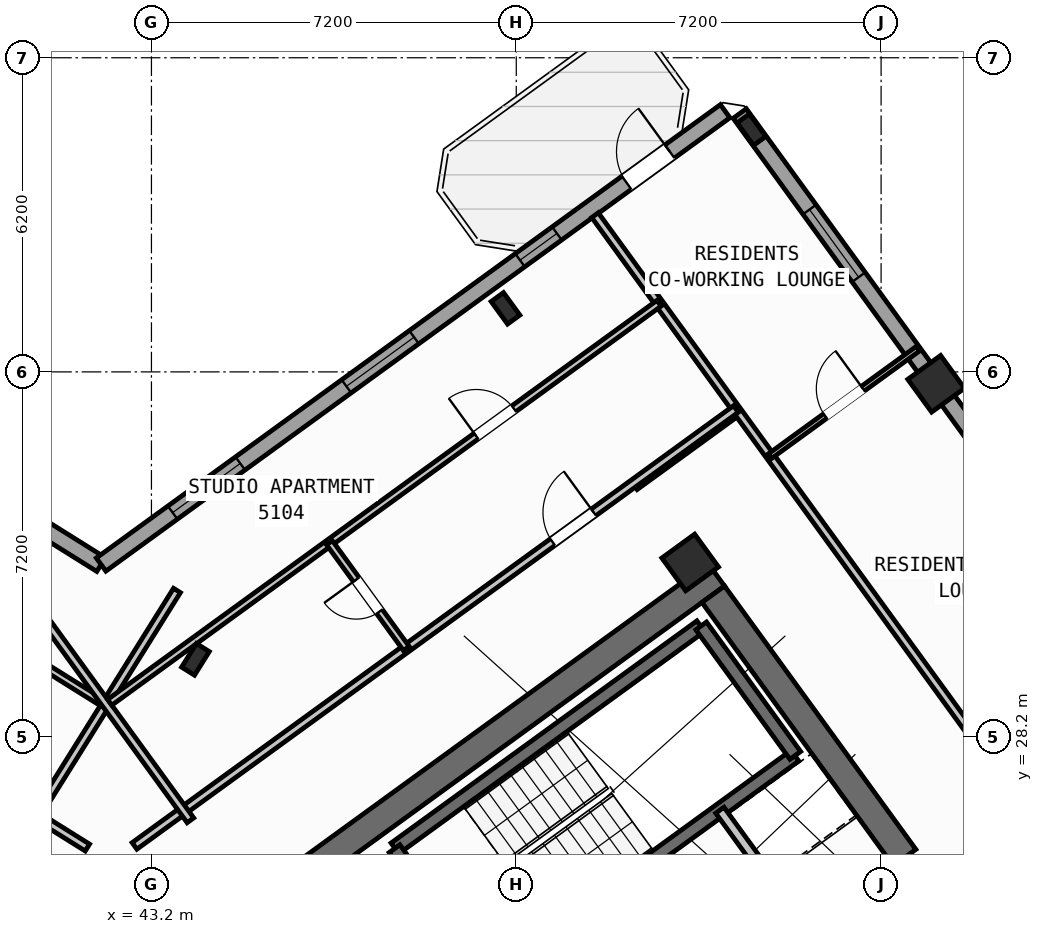
"""IFC4 building model, lengths in metres.
Left out: names, types, materials, properties, quantities, classifications, styles, units other than length and angle.
Written with IfcOpenShell. Run it as: python <this file> out.ifc"""

import sys

from ifc_helpers import new_model, si_unit, direction, frame, frame_2d, origin, origin_2d, place, context, subcontext, project, spatial, rectangle, hollow_rectangle, i_section, extrude, source, transform, mapped, element, fill, save


model = new_model("IFC4")
c1 = context("Model", 3, precision=1e-05, world=origin(), true_north=direction((0.0, 1.0)))
c2 = subcontext(c1, "Body", "Model", "MODEL_VIEW")
j1 = project(units=[si_unit("LENGTHUNIT", "METRE"), si_unit("PLANEANGLEUNIT", "RADIAN")], contexts=[c1])
p1 = place(None, origin())
s1 = spatial("IfcSite", under=j1, at=p1, CompositionType="ELEMENT")
p2 = place(p1, origin())
s2 = spatial("IfcBuilding", under=s1, at=p2, CompositionType="ELEMENT")
p3 = place(p2, frame((0.0, 0.0, 204.0)))
s3 = spatial("IfcBuildingStorey", under=s2, at=p3, CompositionType="ELEMENT", Elevation=204.0)
p4 = place(p3, frame((44.365, 24.142, 0.0), z_axis=(0.0, 0.0, 1.0), x_axis=(0.809024304885, 0.587775190107, 0.0)))
e1 = element("IfcWall", 1, at=p4, inside=s3, PredefinedType="SHEAR", context=c2, shape_type="SweptSolid", body=[
    extrude(rectangle(XDim=12.34, YDim=0.55, at=frame_2d((6.17, 0.0))), origin(), (0.0, 0.0, 1.0), 3.35),
])
p5 = place(p3, frame((58.064, 25.813, 0.0), z_axis=(0.0, 0.0, 1.0), x_axis=(-0.587764933797, 0.809031756236, 0.0)))
e2 = element("IfcWall", 2, at=p5, inside=s3, PredefinedType="SHEAR", context=c2, shape_type="SweptSolid", body=[
    extrude(rectangle(XDim=6.425, YDim=0.55, at=frame_2d((3.212, 0.0))), origin(), (0.0, 0.0, 1.0), 3.35),
])
m1 = source(origin(), c2, "Body", "SweptSolid", [
    extrude(i_section(OverallWidth=0.3, OverallDepth=0.55, WebThickness=0.015, FlangeThickness=0.029, at=origin_2d()), origin(), (0.0, 0.0, 1.0), 3.6),
])
p6 = place(p3, frame((44.068, 29.726, 0.0), z_axis=(0.0, 0.0, 1.0), x_axis=(-0.848048096156, 0.529919264233, 0.0)))
e3 = element("IfcColumn", 3, at=p6, inside=s3, PredefinedType="COLUMN", context=c2, shape_type="MappedRepresentation", body=[
    mapped(m1, transform((0.0, 0.0, 0.0), scale=1.0)),
])
m2 = source(origin(), c2, "Body", "SweptSolid", [
    extrude(hollow_rectangle(XDim=0.8, YDim=0.8, WallThickness=0.032, at=origin_2d()), origin(), (0.0, 0.0, 1.0), 3.6),
])
p7 = place(p3, frame((53.832, 31.638, 0.0), z_axis=(0.0, 0.0, 1.0), x_axis=(0.809016994375, 0.587785252292, 0.0)))
e4 = element("IfcColumn", 4, at=p7, inside=s3, PredefinedType="COLUMN", context=c2, shape_type="MappedRepresentation", body=[
    mapped(m2, transform((0.0, 0.0, 0.0), scale=1.0)),
])
p8 = place(p3, frame((50.188, 36.654, 0.0), z_axis=(0.0, 0.0, 1.0), x_axis=(0.809016994375, 0.587785252292, 0.0)))
e5 = element("IfcColumn", 5, at=p8, inside=s3, PredefinedType="COLUMN", context=c2, shape_type="MappedRepresentation", body=[
    mapped(m1, transform((0.0, 0.0, 0.0), scale=1.0)),
])
p9 = place(p3, frame((58.686, 35.165, 0.0), z_axis=(0.0, 0.0, 1.0), x_axis=(0.809016994375, 0.587785252292, 0.0)))
e6 = element("IfcColumn", 6, at=p9, inside=s3, PredefinedType="COLUMN", context=c2, shape_type="MappedRepresentation", body=[
    mapped(m2, transform((0.0, 0.0, 0.0), scale=1.0)),
])
p10 = place(p3, frame((55.042, 40.181, 0.0), z_axis=(0.0, 0.0, 1.0), x_axis=(0.809016994375, 0.587785252292, 0.0)))
e7 = element("IfcColumn", 7, at=p10, inside=s3, PredefinedType="COLUMN", context=c2, shape_type="MappedRepresentation", body=[
    mapped(m1, transform((0.0, 0.0, 0.0), scale=1.0)),
])
p11 = place(p3, frame((17.424, 47.083, 0.0), z_axis=(0.0, 0.0, 1.0), x_axis=(0.848049927979, -0.529916332693, 0.0)))
e8 = element("IfcWall", 8, at=p11, inside=s3, PredefinedType="STANDARD", context=c2, shape_type="SweptSolid", body=[
    extrude(rectangle(XDim=29.223, YDim=0.32, at=frame_2d((14.612, 0.0))), origin(), (0.0, 0.0, 1.0), 3.35),
])
p12 = place(p11, frame((8.799, 0.0, 0.0)))
e9 = element("IfcOpeningElement", 9, at=p12, cuts=e8, PredefinedType="OPENING", context=c2, shape_type="SweptSolid", body=[
    extrude(rectangle(XDim=1.05, YDim=2.15, at=frame_2d((0.525, 1.075))), frame((0.0, 0.17, 0.0), z_axis=(0.0, -1.0, 0.0), x_axis=(1.0, 0.0, 0.0)), (0.0, 0.0, 1.0), 0.34),
])
p13 = place(p11, frame((0.794, 0.0, 0.9)))
e10 = element("IfcOpeningElement", 10, at=p13, cuts=e8, PredefinedType="OPENING", context=c2, shape_type="SweptSolid", body=[
    extrude(rectangle(XDim=1.65, YDim=1.45, at=frame_2d((0.825, 0.725))), frame((0.0, 0.17, 0.0), z_axis=(0.0, -1.0, 0.0), x_axis=(1.0, 0.0, 0.0)), (0.0, 0.0, 1.0), 0.34),
])
p14 = place(p11, frame((4.056, 0.0, 0.9)))
e11 = element("IfcOpeningElement", 11, at=p14, cuts=e8, PredefinedType="OPENING", context=c2, shape_type="SweptSolid", body=[
    extrude(rectangle(XDim=1.35, YDim=1.45, at=frame_2d((0.675, 0.725))), frame((0.0, 0.17, 0.0), z_axis=(0.0, -1.0, 0.0), x_axis=(1.0, 0.0, 0.0)), (0.0, 0.0, 1.0), 0.34),
])
p15 = place(p11, frame((7.151, 0.0, 1.0)))
e12 = element("IfcOpeningElement", 12, at=p15, cuts=e8, PredefinedType="OPENING", context=c2, shape_type="SweptSolid", body=[
    extrude(rectangle(XDim=0.9, YDim=1.25, at=frame_2d((0.45, 0.625))), frame((0.0, 0.17, 0.0), z_axis=(0.0, -1.0, 0.0), x_axis=(1.0, 0.0, 0.0)), (0.0, 0.0, 1.0), 0.34),
])
p16 = place(p11, frame((14.612, 0.0, 1.0)))
e13 = element("IfcOpeningElement", 13, at=p16, cuts=e8, PredefinedType="OPENING", context=c2, shape_type="SweptSolid", body=[
    extrude(rectangle(XDim=0.9, YDim=1.25, at=frame_2d((0.45, 0.625))), frame((0.0, 0.17, 0.0), z_axis=(0.0, -1.0, 0.0), x_axis=(1.0, 0.0, 0.0)), (0.0, 0.0, 1.0), 0.34),
])
p17 = place(p11, frame((17.254, 0.0, 1.0)))
e14 = element("IfcOpeningElement", 14, at=p17, cuts=e8, PredefinedType="OPENING", context=c2, shape_type="SweptSolid", body=[
    extrude(rectangle(XDim=0.9, YDim=1.25, at=frame_2d((0.45, 0.625))), frame((0.0, 0.17, 0.0), z_axis=(0.0, -1.0, 0.0), x_axis=(1.0, 0.0, 0.0)), (0.0, 0.0, 1.0), 0.34),
])
p18 = place(p11, frame((21.139, 0.0, 0.9)))
e15 = element("IfcOpeningElement", 15, at=p18, cuts=e8, PredefinedType="OPENING", context=c2, shape_type="SweptSolid", body=[
    extrude(rectangle(XDim=1.35, YDim=1.45, at=frame_2d((0.675, 0.725))), frame((0.0, 0.17, 0.0), z_axis=(0.0, -1.0, 0.0), x_axis=(1.0, 0.0, 0.0)), (0.0, 0.0, 1.0), 0.34),
])
p19 = place(p11, frame((25.778, 0.0, 0.9)))
e16 = element("IfcOpeningElement", 16, at=p19, cuts=e8, PredefinedType="OPENING", context=c2, shape_type="SweptSolid", body=[
    extrude(rectangle(XDim=1.35, YDim=1.45, at=frame_2d((0.675, 0.725))), frame((0.0, 0.17, 0.0), z_axis=(0.0, -1.0, 0.0), x_axis=(1.0, 0.0, 0.0)), (0.0, 0.0, 1.0), 0.34),
])
p20 = place(p3, frame((42.207, 31.597, 0.0), z_axis=(0.0, 0.0, 1.0), x_axis=(0.809020333377, 0.587780656523, 0.0)))
e17 = element("IfcWall", 17, at=p20, inside=s3, PredefinedType="STANDARD", context=c2, shape_type="SweptSolid", body=[
    extrude(rectangle(XDim=15.223, YDim=0.32, at=frame_2d((7.611, 0.0))), origin(), (0.0, 0.0, 1.0), 3.35),
])
p21 = place(p20, frame((12.82, 0.0, 0.0)))
e18 = element("IfcOpeningElement", 18, at=p21, cuts=e17, PredefinedType="OPENING", context=c2, shape_type="SweptSolid", body=[
    extrude(rectangle(XDim=1.05, YDim=2.15, at=frame_2d((0.525, 1.075))), frame((0.0, 0.17, 0.0), z_axis=(0.0, -1.0, 0.0), x_axis=(1.0, 0.0, 0.0)), (0.0, 0.0, 1.0), 0.34),
])
p22 = place(p20, frame((1.745, 0.0, 0.9)))
e19 = element("IfcOpeningElement", 19, at=p22, cuts=e17, PredefinedType="OPENING", context=c2, shape_type="SweptSolid", body=[
    extrude(rectangle(XDim=1.65, YDim=1.45, at=frame_2d((0.825, 0.725))), frame((0.0, 0.17, 0.0), z_axis=(0.0, -1.0, 0.0), x_axis=(1.0, 0.0, 0.0)), (0.0, 0.0, 1.0), 0.34),
])
p23 = place(p20, frame((5.985, 0.0, 0.9)))
e20 = element("IfcOpeningElement", 20, at=p23, cuts=e17, PredefinedType="OPENING", context=c2, shape_type="SweptSolid", body=[
    extrude(rectangle(XDim=1.65, YDim=1.45, at=frame_2d((0.825, 0.725))), frame((0.0, 0.17, 0.0), z_axis=(0.0, -1.0, 0.0), x_axis=(1.0, 0.0, 0.0)), (0.0, 0.0, 1.0), 0.34),
])
p24 = place(p20, frame((10.219, 0.0, 1.0)))
e21 = element("IfcOpeningElement", 21, at=p24, cuts=e17, PredefinedType="OPENING", context=c2, shape_type="SweptSolid", body=[
    extrude(rectangle(XDim=0.9, YDim=1.25, at=frame_2d((0.45, 0.625))), frame((0.0, 0.17, 0.0), z_axis=(0.0, -1.0, 0.0), x_axis=(1.0, 0.0, 0.0)), (0.0, 0.0, 1.0), 0.34),
])
p25 = place(p3, frame((54.81, 40.5, 0.0), z_axis=(0.0, 0.0, 1.0), x_axis=(0.587783625747, -0.809018176127, 0.0)))
e22 = element("IfcWall", 22, at=p25, inside=s3, PredefinedType="STANDARD", context=c2, shape_type="SweptSolid", body=[
    extrude(rectangle(XDim=21.587, YDim=0.32, at=frame_2d((10.794, 0.0))), origin(), (0.0, 0.0, 1.0), 2.825),
])
p26 = place(p25, frame((2.343, 0.0, 0.9)))
e23 = element("IfcOpeningElement", 23, at=p26, cuts=e22, PredefinedType="OPENING", context=c2, shape_type="SweptSolid", body=[
    extrude(rectangle(XDim=1.65, YDim=1.45, at=frame_2d((0.825, 0.725))), frame((0.0, 0.17, 0.0), z_axis=(0.0, -1.0, 0.0), x_axis=(1.0, 0.0, 0.0)), (0.0, 0.0, 1.0), 0.34),
])
p27 = place(p25, frame((8.119, 0.0, 0.9)))
e24 = element("IfcOpeningElement", 24, at=p27, cuts=e22, PredefinedType="OPENING", context=c2, shape_type="SweptSolid", body=[
    extrude(rectangle(XDim=1.35, YDim=1.45, at=frame_2d((0.675, 0.725))), frame((0.0, 0.17, 0.0), z_axis=(0.0, -1.0, 0.0), x_axis=(1.0, 0.0, 0.0)), (0.0, 0.0, 1.0), 0.34),
])
p28 = place(p25, frame((11.019, 0.0, 0.9)))
e25 = element("IfcOpeningElement", 25, at=p28, cuts=e22, PredefinedType="OPENING", context=c2, shape_type="SweptSolid", body=[
    extrude(rectangle(XDim=1.35, YDim=1.45, at=frame_2d((0.675, 0.725))), frame((0.0, 0.17, 0.0), z_axis=(0.0, -1.0, 0.0), x_axis=(1.0, 0.0, 0.0)), (0.0, 0.0, 1.0), 0.34),
])
p29 = place(p25, frame((18.634, 0.0, 1.0)))
e26 = element("IfcOpeningElement", 26, at=p29, cuts=e22, PredefinedType="OPENING", context=c2, shape_type="SweptSolid", body=[
    extrude(rectangle(XDim=0.9, YDim=1.25, at=frame_2d((0.45, 0.625))), frame((0.0, 0.17, 0.0), z_axis=(0.0, -1.0, 0.0), x_axis=(1.0, 0.0, 0.0)), (0.0, 0.0, 1.0), 0.34),
])
p30 = place(p3, frame((48.006, 25.996, 0.0), z_axis=(0.0, 0.0, 1.0), x_axis=(0.80901903764, 0.587782439969, 0.0)))
e27 = element("IfcWall", 27, at=p30, inside=s3, PredefinedType="SHEAR", context=c2, shape_type="SweptSolid", body=[
    extrude(rectangle(XDim=7.46, YDim=0.26, at=frame_2d((3.73, 0.0))), origin(), (0.0, 0.0, 1.0), 3.35),
])
p31 = place(p3, frame((49.863, 23.44, 0.0), z_axis=(0.0, 0.0, 1.0), x_axis=(0.809003474932, 0.587803859759, 0.0)))
e28 = element("IfcWall", 28, at=p31, inside=s3, PredefinedType="SHEAR", context=c2, shape_type="SweptSolid", body=[
    extrude(rectangle(XDim=7.46, YDim=0.26, at=frame_2d((3.73, 0.0))), origin(), (0.0, 0.0, 1.0), 3.35),
])
p32 = place(p31, frame((0.36, 0.0, 0.0)))
e29 = element("IfcOpeningElement", 29, at=p32, cuts=e28, PredefinedType="OPENING", context=c2, shape_type="SweptSolid", body=[
    extrude(rectangle(XDim=0.86, YDim=2.05, at=frame_2d((0.43, 1.025))), frame((0.0, 0.14, 0.0), z_axis=(0.0, -1.0, 0.0), x_axis=(1.0, 0.0, 0.0)), (0.0, 0.0, 1.0), 0.28),
])
p33 = place(p3, frame((49.855, 23.434, 0.0), z_axis=(0.0, 0.0, 1.0), x_axis=(-0.58776738483, 0.809029975545, 0.0)))
e30 = element("IfcWall", 30, at=p33, inside=s3, PredefinedType="SHEAR", context=c2, shape_type="SweptSolid", body=[
    extrude(rectangle(XDim=3.16, YDim=0.26, at=frame_2d((1.58, 0.0))), origin(), (0.0, 0.0, 1.0), 3.35),
])
p34 = place(p3, frame((55.906, 27.831, 0.0), z_axis=(0.0, 0.0, 1.0), x_axis=(-0.587804123638, 0.809003283204, 0.0)))
e31 = element("IfcWall", 31, at=p34, inside=s3, PredefinedType="SHEAR", context=c2, shape_type="SweptSolid", body=[
    extrude(rectangle(XDim=3.16, YDim=0.26, at=frame_2d((1.58, 0.0))), origin(), (0.0, 0.0, 1.0), 3.35),
])
p35 = place(p3, frame((56.111, 24.419, 0.0), z_axis=(0.0, 0.0, 1.0), x_axis=(-0.58777848983, 0.809021907548, 0.0)))
e32 = element("IfcWall", 32, at=p35, inside=s3, PredefinedType="STANDARD", context=c2, shape_type="SweptSolid", body=[
    extrude(rectangle(XDim=2.88, YDim=0.2, at=frame_2d((1.44, 0.0))), origin(), (0.0, 0.0, 1.0), 3.34),
])
p36 = place(p3, frame((41.936, 26.012, 0.0), z_axis=(0.0, 0.0, 1.0), x_axis=(-0.848051154596, 0.529914369676, 0.0)))
e33 = element("IfcWall", 33, at=p36, inside=s3, PredefinedType="PARTITIONING", context=c2, shape_type="SweptSolid", body=[
    extrude(rectangle(XDim=15.57, YDim=0.16, at=frame_2d((7.785, 0.0))), origin(), (0.0, 0.0, 1.0), 3.34),
])
p37 = place(p36, frame((10.83, 0.0, 0.0)))
e34 = element("IfcOpeningElement", 34, at=p37, cuts=e33, PredefinedType="OPENING", context=c2, shape_type="SweptSolid", body=[
    extrude(rectangle(XDim=1.0, YDim=2.1, at=frame_2d((0.5, 1.05))), frame((0.0, 0.09, 0.0), z_axis=(0.0, -1.0, 0.0), x_axis=(1.0, 0.0, 0.0)), (0.0, 0.0, 1.0), 0.18),
])
p38 = place(p3, frame((43.704, 31.086, 0.0), z_axis=(0.0, 0.0, 1.0), x_axis=(-0.529906828443, -0.848055866774, 0.0)))
e35 = element("IfcWall", 35, at=p38, inside=s3, PredefinedType="PARTITIONING", context=c2, shape_type="SweptSolid", body=[
    extrude(rectangle(XDim=5.48, YDim=0.16, at=frame_2d((2.74, 0.0))), origin(), (0.0, 0.0, 1.0), 3.34),
])
p39 = place(p3, frame((42.226, 28.873, 0.0), z_axis=(0.0, 0.0, 1.0), x_axis=(-0.848049134363, 0.529917602752, 0.0)))
e36 = element("IfcWall", 36, at=p39, inside=s3, PredefinedType="PLUMBINGWALL", context=c2, shape_type="SweptSolid", body=[
    extrude(rectangle(XDim=14.3, YDim=0.14, at=frame_2d((7.15, 0.0))), origin(), (0.0, 0.0, 1.0), 3.34),
])
p40 = place(p39, frame((9.57, 0.0, 0.0)))
e37 = element("IfcOpeningElement", 37, at=p40, cuts=e36, PredefinedType="OPENING", context=c2, shape_type="SweptSolid", body=[
    extrude(rectangle(XDim=0.92, YDim=2.08, at=frame_2d((0.46, 1.04))), frame((0.0, 0.08, 0.0), z_axis=(0.0, -1.0, 0.0), x_axis=(1.0, 0.0, 0.0)), (0.0, 0.0, 1.0), 0.16),
])
p41 = place(p3, frame((52.739, 33.143, 0.0), z_axis=(0.0, 0.0, 1.0), x_axis=(0.809000999347, 0.58780726693, 0.0)))
e38 = element("IfcWall", 38, at=p41, inside=s3, PredefinedType="PARTITIONING", context=c2, shape_type="SweptSolid", body=[
    extrude(rectangle(XDim=2.51, YDim=0.16, at=frame_2d((1.255, 0.0))), origin(), (0.0, 0.0, 1.0), 3.34),
])
p42 = place(p3, frame((60.829, 26.278, 0.0), z_axis=(0.0, 0.0, 1.0), x_axis=(-0.587777474174, 0.809022645451, 0.0)))
e39 = element("IfcWall", 39, at=p42, inside=s3, PredefinedType="PARTITIONING", context=c2, shape_type="SweptSolid", body=[
    extrude(rectangle(XDim=15.1, YDim=0.16, at=frame_2d((7.55, 0.0))), origin(), (0.0, 0.0, 1.0), 3.34),
])
p43 = place(p3, frame((55.409, 33.738, 0.0), z_axis=(0.0, 0.0, 1.0), x_axis=(0.809005039917, 0.58780170584, 0.0)))
e40 = element("IfcWall", 40, at=p43, inside=s3, PredefinedType="PARTITIONING", context=c2, shape_type="SweptSolid", body=[
    extrude(rectangle(XDim=3.61, YDim=0.11, at=frame_2d((1.805, 0.0))), origin(), (0.0, 0.0, 1.0), 3.34),
])
p44 = place(p43, frame((1.345, 0.0, 0.0)))
e41 = element("IfcOpeningElement", 41, at=p44, cuts=e40, PredefinedType="OPENING", context=c2, shape_type="SweptSolid", body=[
    extrude(rectangle(XDim=0.92, YDim=2.08, at=frame_2d((0.46, 1.04))), frame((0.0, 0.065, 0.0), z_axis=(0.0, -1.0, 0.0), x_axis=(1.0, 0.0, 0.0)), (0.0, 0.0, 1.0), 0.13),
])
p45 = place(p3, frame((42.866, 26.044, 0.0), z_axis=(0.0, 0.0, 1.0), x_axis=(0.809020254154, 0.587780765566, 0.0)))
e42 = element("IfcWall", 42, at=p45, inside=s3, PredefinedType="PARTITIONING", context=c2, shape_type="SweptSolid", body=[
    extrude(rectangle(XDim=14.67, YDim=0.16, at=frame_2d((7.335, 0.0))), origin(), (0.0, 0.0, 1.0), 3.34),
])
p46 = place(p45, frame((10.2, 0.0, 0.0)))
e43 = element("IfcOpeningElement", 43, at=p46, cuts=e42, PredefinedType="OPENING", context=c2, shape_type="SweptSolid", body=[
    extrude(rectangle(XDim=1.0, YDim=2.1, at=frame_2d((0.5, 1.05))), frame((0.0, 0.09, 0.0), z_axis=(0.0, -1.0, 0.0), x_axis=(1.0, 0.0, 0.0)), (0.0, 0.0, 1.0), 0.18),
])
p47 = place(p3, frame((43.969, 26.55, 0.0), z_axis=(0.0, 0.0, 1.0), x_axis=(-0.587776919386, 0.80902304852, 0.0)))
e44 = element("IfcWall", 44, at=p47, inside=s3, PredefinedType="PARTITIONING", context=c2, shape_type="SweptSolid", body=[
    extrude(rectangle(XDim=5.48, YDim=0.16, at=frame_2d((2.74, 0.0))), origin(), (0.0, 0.0, 1.0), 3.34),
])
p48 = place(p3, frame((42.377, 28.878, 0.0), z_axis=(0.0, 0.0, 1.0), x_axis=(0.809020411523, 0.587780548963, 0.0)))
e45 = element("IfcWall", 45, at=p48, inside=s3, PredefinedType="PLUMBINGWALL", context=c2, shape_type="SweptSolid", body=[
    extrude(rectangle(XDim=13.4, YDim=0.14, at=frame_2d((6.7, 0.0))), origin(), (0.0, 0.0, 1.0), 3.34),
])
p49 = place(p48, frame((8.94, 0.0, 0.0)))
e46 = element("IfcOpeningElement", 46, at=p49, cuts=e45, PredefinedType="OPENING", context=c2, shape_type="SweptSolid", body=[
    extrude(rectangle(XDim=0.92, YDim=2.08, at=frame_2d((0.46, 1.04))), frame((0.0, 0.08, 0.0), z_axis=(0.0, -1.0, 0.0), x_axis=(1.0, 0.0, 0.0)), (0.0, 0.0, 1.0), 0.16),
])
p50 = place(p3, frame((48.229, 29.941, 0.0), z_axis=(0.0, 0.0, 1.0), x_axis=(-0.587772116736, 0.809026537752, 0.0)))
e47 = element("IfcWall", 47, at=p50, inside=s3, PredefinedType="PLUMBINGWALL", context=c2, shape_type="SweptSolid", body=[
    extrude(rectangle(XDim=2.58, YDim=0.14, at=frame_2d((1.29, 0.0))), origin(), (0.0, 0.0, 1.0), 3.34),
])
p51 = place(p50, frame((0.9, 0.0, 0.0)))
e48 = element("IfcOpeningElement", 48, at=p51, cuts=e47, PredefinedType="OPENING", context=c2, shape_type="SweptSolid", body=[
    extrude(rectangle(XDim=0.78, YDim=2.05, at=frame_2d((0.39, 1.025))), frame((0.0, 0.08, 0.0), z_axis=(0.0, -1.0, 0.0), x_axis=(1.0, 0.0, 0.0)), (0.0, 0.0, 1.0), 0.16),
])
m3 = source(origin(), c2, "Body", "SweptSolid", [
    extrude(rectangle(XDim=1.05, YDim=2.15, at=frame_2d((0.525, 1.075))), frame((0.0, 0.025, 0.0), z_axis=(0.0, -1.0, 0.0), x_axis=(1.0, 0.0, 0.0)), (0.0, 0.0, 1.0), 0.05),
])
p52 = place(p21, origin())
e49 = element("IfcDoor", 49, at=p52, inside=s3, OperationType="SINGLE_SWING_RIGHT", PredefinedType="DOOR", context=c2, shape_type="MappedRepresentation", body=[
    mapped(m3, transform((0.0, 0.0, 0.0), scale=1.0)),
])
fill(e18, e49)
m4 = source(origin(), c2, "Body", "SweptSolid", [
    extrude(rectangle(XDim=1.65, YDim=1.45, at=frame_2d((0.825, 0.725))), frame((0.0, 0.03, 0.0), z_axis=(0.0, -1.0, 0.0), x_axis=(1.0, 0.0, 0.0)), (0.0, 0.0, 1.0), 0.06),
])
p53 = place(p22, origin())
e50 = element("IfcWindow", 50, at=p53, inside=s3, PartitioningType="SINGLE_PANEL", PredefinedType="WINDOW", context=c2, shape_type="MappedRepresentation", body=[
    mapped(m4, transform((0.0, 0.0, 0.0), scale=1.0)),
])
fill(e19, e50)
p54 = place(p23, origin())
e51 = element("IfcWindow", 51, at=p54, inside=s3, PartitioningType="SINGLE_PANEL", PredefinedType="WINDOW", context=c2, shape_type="MappedRepresentation", body=[
    mapped(m4, transform((0.0, 0.0, 0.0), scale=1.0)),
])
fill(e20, e51)
m5 = source(origin(), c2, "Body", "SweptSolid", [
    extrude(rectangle(XDim=0.9, YDim=1.25, at=frame_2d((0.45, 0.625))), frame((0.0, 0.03, 0.0), z_axis=(0.0, -1.0, 0.0), x_axis=(1.0, 0.0, 0.0)), (0.0, 0.0, 1.0), 0.06),
])
p55 = place(p24, origin())
e52 = element("IfcWindow", 52, at=p55, inside=s3, PartitioningType="SINGLE_PANEL", PredefinedType="WINDOW", context=c2, shape_type="MappedRepresentation", body=[
    mapped(m5, transform((0.0, 0.0, 0.0), scale=1.0)),
])
fill(e21, e52)
p56 = place(p26, origin())
e53 = element("IfcWindow", 53, at=p56, inside=s3, PartitioningType="SINGLE_PANEL", PredefinedType="WINDOW", context=c2, shape_type="MappedRepresentation", body=[
    mapped(m4, transform((0.0, 0.0, 0.0), scale=1.0)),
])
fill(e23, e53)
m6 = source(origin(), c2, "Body", "SweptSolid", [
    extrude(rectangle(XDim=0.92, YDim=2.08, at=frame_2d((0.46, 1.04))), frame((0.0, 0.025, 0.0), z_axis=(0.0, -1.0, 0.0), x_axis=(1.0, 0.0, 0.0)), (0.0, 0.0, 1.0), 0.05),
])
p57 = place(p44, origin())
e54 = element("IfcDoor", 54, at=p57, inside=s3, OperationType="SINGLE_SWING_RIGHT", PredefinedType="DOOR", context=c2, shape_type="MappedRepresentation", body=[
    mapped(m6, transform((0.0, 0.0, 0.0), scale=1.0)),
])
fill(e41, e54)
m7 = source(origin(), c2, "Body", "SweptSolid", [
    extrude(rectangle(XDim=1.0, YDim=2.1, at=frame_2d((0.5, 1.05))), frame((0.0, 0.025, 0.0), z_axis=(0.0, -1.0, 0.0), x_axis=(1.0, 0.0, 0.0)), (0.0, 0.0, 1.0), 0.05),
])
p58 = place(p46, origin())
e55 = element("IfcDoor", 55, at=p58, inside=s3, OperationType="SINGLE_SWING_RIGHT", PredefinedType="DOOR", context=c2, shape_type="MappedRepresentation", body=[
    mapped(m7, transform((0.0, 0.0, 0.0), scale=1.0)),
])
fill(e43, e55)
p59 = place(p49, origin())
e56 = element("IfcDoor", 56, at=p59, inside=s3, OperationType="SINGLE_SWING_LEFT", PredefinedType="DOOR", context=c2, shape_type="MappedRepresentation", body=[
    mapped(m6, transform((0.0, 0.0, 0.0), scale=1.0)),
])
fill(e46, e56)
m8 = source(origin(), c2, "Body", "SweptSolid", [
    extrude(rectangle(XDim=0.78, YDim=2.05, at=frame_2d((0.39, 1.025))), frame((0.0, 0.025, 0.0), z_axis=(0.0, -1.0, 0.0), x_axis=(1.0, 0.0, 0.0)), (0.0, 0.0, 1.0), 0.05),
])
p60 = place(p51, origin())
e57 = element("IfcDoor", 57, at=p60, inside=s3, OperationType="SINGLE_SWING_RIGHT", PredefinedType="DOOR", context=c2, shape_type="MappedRepresentation", body=[
    mapped(m8, transform((0.0, 0.0, 0.0), scale=1.0)),
])
fill(e48, e57)
save(model, sys.argv[1])
